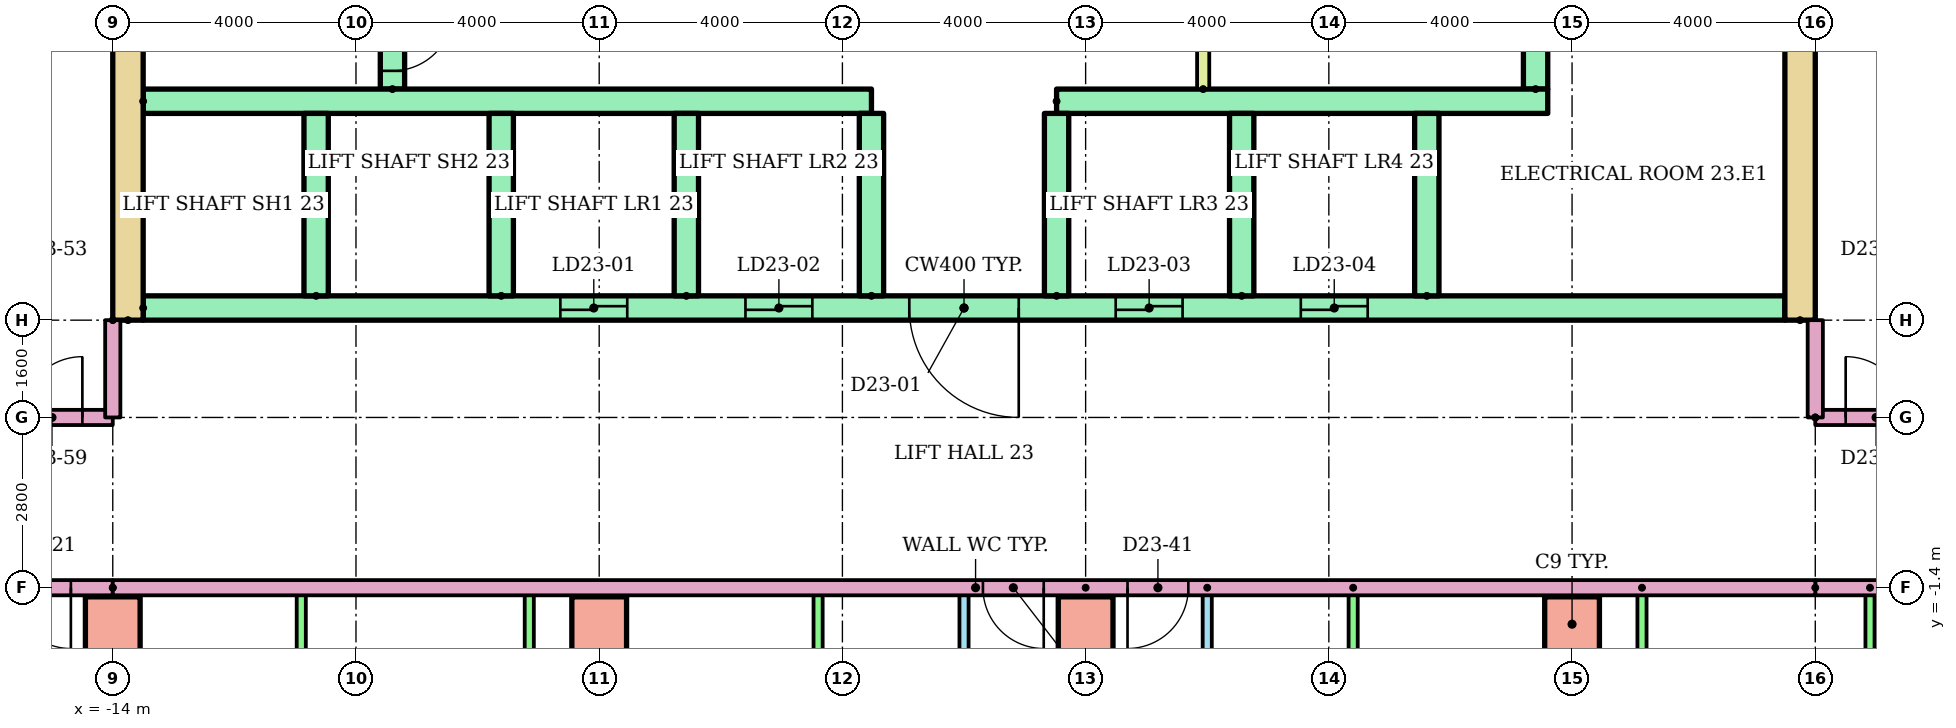
"""IFC4 building model, lengths in metres.
Left out: names, types, materials, properties, quantities, classifications, styles, units other than length and angle.
Written with IfcOpenShell. Run it as: python <this file> out.ifc"""

import sys

from ifc_helpers import new_model, si_unit, direction, frame, frame_2d, origin, origin_2d, place, context, subcontext, project, spatial, rectangle, extrude, element, fill, save


model = new_model("IFC4")
c1 = context("Model", 3, precision=1e-05, world=origin(), true_north=direction((0.0, 1.0)))
c2 = subcontext(c1, "Body", "Model", "MODEL_VIEW")
j1 = project(units=[si_unit("LENGTHUNIT", "METRE"), si_unit("PLANEANGLEUNIT", "RADIAN")], contexts=[c1])
p1 = place(None, origin())
s1 = spatial("IfcSite", under=j1, at=p1, CompositionType="ELEMENT")
p2 = place(p1, origin())
s2 = spatial("IfcBuilding", under=s1, at=p2, CompositionType="ELEMENT")
p3 = place(p2, frame((0.0, 0.0, 90.3)))
s3 = spatial("IfcBuildingStorey", under=s2, at=p3, CompositionType="ELEMENT", Elevation=90.3)
for number, where in (
    (1, (-14.0, -2.0, 0.0)),
    (2, (-6.0, -2.0, 0.0)),
    (3, (2.0, -2.0, 0.0)),
    (4, (10.0, -2.0, 0.0)),
):
    element("IfcColumn", number, at=place(p3, frame(where)), inside=s3, PredefinedType="COLUMN", context=c2, shape_type="SweptSolid", body=[
        extrude(rectangle(XDim=0.9, YDim=0.9, at=origin_2d()), origin(), (0.0, 0.0, 1.0), 3.2),
    ])
for number, where, z_axis, x_axis in (
    (5, (-13.75, 3.0, 0.0), (0.0, 0.0, 1.0), (0.0, 1.0, 0.0)),
    (6, (13.75, 3.0, 0.0), (0.0, 0.0, 1.0), (0.0, 1.0, 0.0)),
):
    element("IfcWall", number, at=place(p3, frame(where, z_axis=z_axis, x_axis=x_axis)), inside=s3, PredefinedType="SHEAR", context=c2, shape_type="SweptSolid", body=[
        extrude(rectangle(XDim=17.0, YDim=0.5, at=frame_2d((8.5, 0.0))), origin(), (0.0, 0.0, 1.0), 2.92),
    ])
p4 = place(p3, frame((-9.4, 6.8, 0.0), z_axis=(0.0, 0.0, 1.0), x_axis=(0.0, 1.0, 0.0)))
e7 = element("IfcWall", 7, at=p4, inside=s3, PredefinedType="SHEAR", context=c2, shape_type="SweptSolid", body=[
    extrude(rectangle(XDim=12.7, YDim=0.4, at=frame_2d((6.35, 0.0))), origin(), (0.0, 0.0, 1.0), 2.92),
])
p5 = place(p4, frame((0.3, 0.0, 0.0)))
e8 = element("IfcOpeningElement", 8, at=p5, cuts=e7, PredefinedType="OPENING", context=c2, shape_type="SweptSolid", body=[
    extrude(rectangle(XDim=1.0, YDim=2.1, at=frame_2d((0.5, 1.05))), frame((0.0, 0.21, 0.0), z_axis=(0.0, -1.0, 0.0), x_axis=(1.0, 0.0, 0.0)), (0.0, 0.0, 1.0), 0.42),
])
p6 = place(p4, frame((2.05, 0.0, 0.0)))
e9 = element("IfcOpeningElement", 9, at=p6, cuts=e7, PredefinedType="OPENING", context=c2, shape_type="SweptSolid", body=[
    extrude(rectangle(XDim=1.0, YDim=2.1, at=frame_2d((0.5, 1.05))), frame((0.0, 0.21, 0.0), z_axis=(0.0, -1.0, 0.0), x_axis=(1.0, 0.0, 0.0)), (0.0, 0.0, 1.0), 0.42),
])
p7 = place(p4, frame((7.925, 0.0, 0.0)))
e10 = element("IfcOpeningElement", 10, at=p7, cuts=e7, PredefinedType="OPENING", context=c2, shape_type="SweptSolid", body=[
    extrude(rectangle(XDim=1.0, YDim=2.1, at=frame_2d((0.5, 1.05))), frame((0.0, 0.21, 0.0), z_axis=(0.0, -1.0, 0.0), x_axis=(1.0, 0.0, 0.0)), (0.0, 0.0, 1.0), 0.42),
])
p8 = place(p3, frame((9.4, 6.8, 0.0), z_axis=(0.0, 0.0, 1.0), x_axis=(0.0, 1.0, 0.0)))
e11 = element("IfcWall", 11, at=p8, inside=s3, PredefinedType="SHEAR", context=c2, shape_type="SweptSolid", body=[
    extrude(rectangle(XDim=12.7, YDim=0.4, at=frame_2d((6.35, 0.0))), origin(), (0.0, 0.0, 1.0), 2.92),
])
p9 = place(p8, frame((1.15, 0.0, 0.0)))
e12 = element("IfcOpeningElement", 12, at=p9, cuts=e11, PredefinedType="OPENING", context=c2, shape_type="SweptSolid", body=[
    extrude(rectangle(XDim=1.0, YDim=2.1, at=frame_2d((0.5, 1.05))), frame((0.0, 0.21, 0.0), z_axis=(0.0, -1.0, 0.0), x_axis=(1.0, 0.0, 0.0)), (0.0, 0.0, 1.0), 0.42),
])
p10 = place(p8, frame((7.925, 0.0, 0.0)))
e13 = element("IfcOpeningElement", 13, at=p10, cuts=e11, PredefinedType="OPENING", context=c2, shape_type="SweptSolid", body=[
    extrude(rectangle(XDim=1.0, YDim=2.1, at=frame_2d((0.5, 1.05))), frame((0.0, 0.21, 0.0), z_axis=(0.0, -1.0, 0.0), x_axis=(1.0, 0.0, 0.0)), (0.0, 0.0, 1.0), 0.42),
])
p11 = place(p3, frame((-13.5, 3.2, 0.0)))
e14 = element("IfcWall", 14, at=p11, inside=s3, PredefinedType="SHEAR", context=c2, shape_type="SweptSolid", body=[
    extrude(rectangle(XDim=27.0, YDim=0.4, at=frame_2d((13.5, 0.0))), origin(), (0.0, 0.0, 1.0), 2.92),
])
p12 = place(p11, frame((6.861, 0.0, 0.0)))
e15 = element("IfcOpeningElement", 15, at=p12, cuts=e14, PredefinedType="OPENING", context=c2, shape_type="SweptSolid", body=[
    extrude(rectangle(XDim=1.1, YDim=2.1, at=frame_2d((0.55, 1.05))), frame((0.0, 0.21, 0.0), z_axis=(0.0, -1.0, 0.0), x_axis=(1.0, 0.0, 0.0)), (0.0, 0.0, 1.0), 0.42),
])
p13 = place(p11, frame((9.906, 0.0, 0.0)))
e16 = element("IfcOpeningElement", 16, at=p13, cuts=e14, PredefinedType="OPENING", context=c2, shape_type="SweptSolid", body=[
    extrude(rectangle(XDim=1.1, YDim=2.1, at=frame_2d((0.55, 1.05))), frame((0.0, 0.21, 0.0), z_axis=(0.0, -1.0, 0.0), x_axis=(1.0, 0.0, 0.0)), (0.0, 0.0, 1.0), 0.42),
])
p14 = place(p11, frame((15.994, 0.0, 0.0)))
e17 = element("IfcOpeningElement", 17, at=p14, cuts=e14, PredefinedType="OPENING", context=c2, shape_type="SweptSolid", body=[
    extrude(rectangle(XDim=1.1, YDim=2.1, at=frame_2d((0.55, 1.05))), frame((0.0, 0.21, 0.0), z_axis=(0.0, -1.0, 0.0), x_axis=(1.0, 0.0, 0.0)), (0.0, 0.0, 1.0), 0.42),
])
p15 = place(p11, frame((19.039, 0.0, 0.0)))
e18 = element("IfcOpeningElement", 18, at=p15, cuts=e14, PredefinedType="OPENING", context=c2, shape_type="SweptSolid", body=[
    extrude(rectangle(XDim=1.1, YDim=2.1, at=frame_2d((0.55, 1.05))), frame((0.0, 0.21, 0.0), z_axis=(0.0, -1.0, 0.0), x_axis=(1.0, 0.0, 0.0)), (0.0, 0.0, 1.0), 0.42),
])
p16 = place(p11, frame((12.6, 0.0, 0.0)))
e19 = element("IfcOpeningElement", 19, at=p16, cuts=e14, PredefinedType="OPENING", context=c2, shape_type="SweptSolid", body=[
    extrude(rectangle(XDim=1.8, YDim=2.1, at=frame_2d((0.9, 1.05))), frame((0.0, 0.21, 0.0), z_axis=(0.0, -1.0, 0.0), x_axis=(1.0, 0.0, 0.0)), (0.0, 0.0, 1.0), 0.42),
])
p17 = place(p3, frame((-13.5, 6.6, 0.0)))
e20 = element("IfcWall", 20, at=p17, inside=s3, PredefinedType="SHEAR", context=c2, shape_type="SweptSolid", body=[
    extrude(rectangle(XDim=11.978, YDim=0.4, at=frame_2d((5.989, 0.0))), origin(), (0.0, 0.0, 1.0), 2.92),
])
p18 = place(p3, frame((1.522, 6.6, 0.0)))
e21 = element("IfcWall", 21, at=p18, inside=s3, PredefinedType="SHEAR", context=c2, shape_type="SweptSolid", body=[
    extrude(rectangle(XDim=8.078, YDim=0.4, at=frame_2d((4.039, 0.0))), origin(), (0.0, 0.0, 1.0), 2.92),
])
for number, where, z_axis, x_axis in (
    (22, (-10.656, 3.4, 0.0), (0.0, 0.0, 1.0), (0.0, 1.0, 0.0)),
    (23, (-7.611, 3.4, 0.0), (0.0, 0.0, 1.0), (0.0, 1.0, 0.0)),
    (24, (-4.567, 3.4, 0.0), (0.0, 0.0, 1.0), (0.0, 1.0, 0.0)),
    (25, (-1.522, 3.4, 0.0), (0.0, 0.0, 1.0), (0.0, 1.0, 0.0)),
    (26, (1.522, 3.4, 0.0), (0.0, 0.0, 1.0), (0.0, 1.0, 0.0)),
    (27, (4.567, 3.4, 0.0), (0.0, 0.0, 1.0), (0.0, 1.0, 0.0)),
    (28, (7.611, 3.4, 0.0), (0.0, 0.0, 1.0), (0.0, 1.0, 0.0)),
):
    element("IfcWall", number, at=place(p3, frame(where, z_axis=z_axis, x_axis=x_axis)), inside=s3, PredefinedType="SHEAR", context=c2, shape_type="SweptSolid", body=[
        extrude(rectangle(XDim=3.0, YDim=0.4, at=frame_2d((1.5, 0.0))), origin(), (0.0, 0.0, 1.0), 2.92),
    ])
p19 = place(p3, frame((3.933, 6.8, 0.0), z_axis=(0.0, 0.0, 1.0), x_axis=(0.0, 1.0, 0.0)))
e29 = element("IfcWall", 29, at=p19, inside=s3, PredefinedType="PARTITIONING", context=c2, shape_type="SweptSolid", body=[
    extrude(rectangle(XDim=3.3, YDim=0.2, at=frame_2d((1.65, 0.0))), origin(), (0.0, 0.0, 1.0), 2.92),
])
p20 = place(p19, frame((1.1, 0.0, 0.0)))
e30 = element("IfcOpeningElement", 30, at=p20, cuts=e29, PredefinedType="OPENING", context=c2, shape_type="SweptSolid", body=[
    extrude(rectangle(XDim=1.1, YDim=2.1, at=frame_2d((0.55, 1.05))), frame((0.0, 0.11, 0.0), z_axis=(0.0, -1.0, 0.0), x_axis=(1.0, 0.0, 0.0)), (0.0, 0.0, 1.0), 0.22),
])
p21 = place(p3, frame((0.0, -9.1, 0.0), z_axis=(0.0, 0.0, 1.0), x_axis=(0.0, 1.0, 0.0)))
e31 = element("IfcWall", 31, at=p21, inside=s3, PredefinedType="PARTITIONING", context=c2, shape_type="SweptSolid", body=[
    extrude(rectangle(XDim=7.7, YDim=0.15, at=frame_2d((3.85, 0.0))), origin(), (0.0, 0.0, 1.0), 2.4),
])
p22 = place(p21, frame((5.125, 0.0, 0.0)))
e32 = element("IfcOpeningElement", 32, at=p22, cuts=e31, PredefinedType="OPENING", context=c2, shape_type="SweptSolid", body=[
    extrude(rectangle(XDim=0.9, YDim=2.1, at=frame_2d((0.45, 1.05))), frame((0.0, 0.085, 0.0), z_axis=(0.0, -1.0, 0.0), x_axis=(1.0, 0.0, 0.0)), (0.0, 0.0, 1.0), 0.17),
])
p23 = place(p21, frame((1.325, 0.0, 0.0)))
e33 = element("IfcOpeningElement", 33, at=p23, cuts=e31, PredefinedType="OPENING", context=c2, shape_type="SweptSolid", body=[
    extrude(rectangle(XDim=0.8, YDim=2.1, at=frame_2d((0.4, 1.05))), frame((0.0, 0.085, 0.0), z_axis=(0.0, -1.0, 0.0), x_axis=(1.0, 0.0, 0.0)), (0.0, 0.0, 1.0), 0.17),
])
for number, where, z_axis, x_axis in (
    (34, (-2.4, -9.1, 0.0), (0.0, 0.0, 1.0), (0.0, 1.0, 0.0)),
    (35, (-7.15, -9.1, 0.0), (0.0, 0.0, 1.0), (0.0, 1.0, 0.0)),
    (36, (-10.9, -9.1, 0.0), (0.0, 0.0, 1.0), (0.0, 1.0, 0.0)),
):
    element("IfcWall", number, at=place(p3, frame(where, z_axis=z_axis, x_axis=x_axis)), inside=s3, PredefinedType="PARTITIONING", context=c2, shape_type="SweptSolid", body=[
        extrude(rectangle(XDim=7.7, YDim=0.15, at=frame_2d((3.85, 0.0))), origin(), (0.0, 0.0, 1.0), 2.4),
    ])
p24 = place(p3, frame((-14.0, -1.4, 0.0), z_axis=(0.0, 0.0, 1.0), x_axis=(0.0, -1.0, 0.0)))
e37 = element("IfcWall", 37, at=p24, inside=s3, PredefinedType="PARTITIONING", context=c2, shape_type="SweptSolid", body=[
    extrude(rectangle(XDim=14.81, YDim=0.25, at=frame_2d((7.405, 0.0))), origin(), (0.0, 0.0, 1.0), 2.4),
])
p25 = place(p3, frame((4.0, -1.4, 0.0), z_axis=(0.0, 0.0, 1.0), x_axis=(0.0, -1.0, 0.0)))
e38 = element("IfcWall", 38, at=p25, inside=s3, PredefinedType="PARTITIONING", context=c2, shape_type="SweptSolid", body=[
    extrude(rectangle(XDim=7.7, YDim=0.15, at=frame_2d((3.85, 0.0))), origin(), (0.0, 0.0, 1.0), 2.4),
])
p26 = place(p25, frame((1.675, 0.0, 0.0)))
e39 = element("IfcOpeningElement", 39, at=p26, cuts=e38, PredefinedType="OPENING", context=c2, shape_type="SweptSolid", body=[
    extrude(rectangle(XDim=0.9, YDim=2.1, at=frame_2d((0.45, 1.05))), frame((0.0, 0.085, 0.0), z_axis=(0.0, -1.0, 0.0), x_axis=(1.0, 0.0, 0.0)), (0.0, 0.0, 1.0), 0.17),
])
p27 = place(p25, frame((5.575, 0.0, 0.0)))
e40 = element("IfcOpeningElement", 40, at=p27, cuts=e38, PredefinedType="OPENING", context=c2, shape_type="SweptSolid", body=[
    extrude(rectangle(XDim=0.8, YDim=2.1, at=frame_2d((0.4, 1.05))), frame((0.0, 0.085, 0.0), z_axis=(0.0, -1.0, 0.0), x_axis=(1.0, 0.0, 0.0)), (0.0, 0.0, 1.0), 0.17),
])
for number, where, z_axis, x_axis in (
    (41, (6.4, -1.4, 0.0), (0.0, 0.0, 1.0), (0.0, -1.0, 0.0)),
    (42, (11.15, -1.4, 0.0), (0.0, 0.0, 1.0), (0.0, -1.0, 0.0)),
    (43, (14.9, -1.4, 0.0), (0.0, 0.0, 1.0), (0.0, -1.0, 0.0)),
):
    element("IfcWall", number, at=place(p3, frame(where, z_axis=z_axis, x_axis=x_axis)), inside=s3, PredefinedType="PARTITIONING", context=c2, shape_type="SweptSolid", body=[
        extrude(rectangle(XDim=7.7, YDim=0.15, at=frame_2d((3.85, 0.0))), origin(), (0.0, 0.0, 1.0), 2.4),
    ])
p28 = place(p3, frame((2.0, -1.4, 0.0), z_axis=(0.0, 0.0, 1.0), x_axis=(0.0, -1.0, 0.0)))
e44 = element("IfcWall", 44, at=p28, inside=s3, PredefinedType="PARTITIONING", context=c2, shape_type="SweptSolid", body=[
    extrude(rectangle(XDim=14.81, YDim=0.25, at=frame_2d((7.405, 0.0))), origin(), (0.0, 0.0, 1.0), 2.4),
])
p29 = place(p3, frame((-14.0, -1.4, 0.0), z_axis=(0.0, 0.0, 1.0), x_axis=(-1.0, 0.0, 0.0)))
e45 = element("IfcWall", 45, at=p29, inside=s3, PredefinedType="PARTITIONING", context=c2, shape_type="SweptSolid", body=[
    extrude(rectangle(XDim=14.62, YDim=0.25, at=frame_2d((7.31, 0.0))), origin(), (0.0, 0.0, 1.0), 2.4),
])
p30 = place(p29, frame((0.689, 0.0, 0.0)))
e46 = element("IfcOpeningElement", 46, at=p30, cuts=e45, PredefinedType="OPENING", context=c2, shape_type="SweptSolid", body=[
    extrude(rectangle(XDim=1.0, YDim=2.1, at=frame_2d((0.5, 1.05))), frame((0.0, 0.135, 0.0), z_axis=(0.0, -1.0, 0.0), x_axis=(1.0, 0.0, 0.0)), (0.0, 0.0, 1.0), 0.27),
])
p31 = place(p3, frame((29.0, -1.4, 0.0), z_axis=(0.0, 0.0, 1.0), x_axis=(-1.0, 0.0, 0.0)))
e47 = element("IfcWall", 47, at=p31, inside=s3, PredefinedType="PARTITIONING", context=c2, shape_type="SweptSolid", body=[
    extrude(rectangle(XDim=15.0, YDim=0.25, at=frame_2d((7.5, 0.0))), origin(), (0.0, 0.0, 1.0), 2.4),
])
p32 = place(p31, frame((9.311, 0.0, 0.0)))
e48 = element("IfcOpeningElement", 48, at=p32, cuts=e47, PredefinedType="OPENING", context=c2, shape_type="SweptSolid", body=[
    extrude(rectangle(XDim=1.0, YDim=2.1, at=frame_2d((0.5, 1.05))), frame((0.0, 0.135, 0.0), z_axis=(0.0, -1.0, 0.0), x_axis=(1.0, 0.0, 0.0)), (0.0, 0.0, 1.0), 0.27),
])
p33 = place(p3, frame((-28.62, 1.4, 0.0)))
e49 = element("IfcWall", 49, at=p33, inside=s3, PredefinedType="PARTITIONING", context=c2, shape_type="SweptSolid", body=[
    extrude(rectangle(XDim=14.62, YDim=0.25, at=frame_2d((7.31, 0.0))), origin(), (0.0, 0.0, 1.0), 2.4),
])
p34 = place(p33, frame((13.12, 0.0, 0.0)))
e50 = element("IfcOpeningElement", 50, at=p34, cuts=e49, PredefinedType="OPENING", context=c2, shape_type="SweptSolid", body=[
    extrude(rectangle(XDim=1.0, YDim=2.1, at=frame_2d((0.5, 1.05))), frame((0.0, 0.135, 0.0), z_axis=(0.0, -1.0, 0.0), x_axis=(1.0, 0.0, 0.0)), (0.0, 0.0, 1.0), 0.27),
])
p35 = place(p3, frame((14.0, 1.4, 0.0)))
e51 = element("IfcWall", 51, at=p35, inside=s3, PredefinedType="PARTITIONING", context=c2, shape_type="SweptSolid", body=[
    extrude(rectangle(XDim=15.0, YDim=0.25, at=frame_2d((7.5, 0.0))), origin(), (0.0, 0.0, 1.0), 2.4),
])
p36 = place(p35, frame((0.5, 0.0, 0.0)))
e52 = element("IfcOpeningElement", 52, at=p36, cuts=e51, PredefinedType="OPENING", context=c2, shape_type="SweptSolid", body=[
    extrude(rectangle(XDim=1.0, YDim=2.1, at=frame_2d((0.5, 1.05))), frame((0.0, 0.135, 0.0), z_axis=(0.0, -1.0, 0.0), x_axis=(1.0, 0.0, 0.0)), (0.0, 0.0, 1.0), 0.27),
])
p37 = place(p35, frame((12.689, 0.0, 0.0)))
e53 = element("IfcOpeningElement", 53, at=p37, cuts=e51, PredefinedType="OPENING", context=c2, shape_type="SweptSolid", body=[
    extrude(rectangle(XDim=1.0, YDim=2.1, at=frame_2d((0.5, 1.05))), frame((0.0, 0.135, 0.0), z_axis=(0.0, -1.0, 0.0), x_axis=(1.0, 0.0, 0.0)), (0.0, 0.0, 1.0), 0.27),
])
p38 = place(p3, frame((14.0, -1.4, 0.0), z_axis=(0.0, 0.0, 1.0), x_axis=(-1.0, 0.0, 0.0)))
e54 = element("IfcWall", 54, at=p38, inside=s3, PredefinedType="PARTITIONING", context=c2, shape_type="SweptSolid", body=[
    extrude(rectangle(XDim=28.0, YDim=0.25, at=frame_2d((14.0, 0.0))), origin(), (0.0, 0.0, 1.0), 2.4),
])
p39 = place(p38, frame((12.689, 0.0, 0.0)))
e55 = element("IfcOpeningElement", 55, at=p39, cuts=e54, PredefinedType="OPENING", context=c2, shape_type="SweptSolid", body=[
    extrude(rectangle(XDim=1.0, YDim=2.1, at=frame_2d((0.5, 1.05))), frame((0.0, 0.135, 0.0), z_axis=(0.0, -1.0, 0.0), x_axis=(1.0, 0.0, 0.0)), (0.0, 0.0, 1.0), 0.27),
])
p40 = place(p38, frame((10.311, 0.0, 0.0)))
e56 = element("IfcOpeningElement", 56, at=p40, cuts=e54, PredefinedType="OPENING", context=c2, shape_type="SweptSolid", body=[
    extrude(rectangle(XDim=1.0, YDim=2.1, at=frame_2d((0.5, 1.05))), frame((0.0, 0.135, 0.0), z_axis=(0.0, -1.0, 0.0), x_axis=(1.0, 0.0, 0.0)), (0.0, 0.0, 1.0), 0.27),
])
for number, where, z_axis, x_axis in (
    (57, (-14.0, 3.0, 0.0), (0.0, 0.0, 1.0), (0.0, -1.0, 0.0)),
    (58, (14.0, 1.4, 0.0), (0.0, 0.0, 1.0), (0.0, 1.0, 0.0)),
):
    element("IfcWall", number, at=place(p3, frame(where, z_axis=z_axis, x_axis=x_axis)), inside=s3, PredefinedType="PARTITIONING", context=c2, shape_type="SweptSolid", body=[
        extrude(rectangle(XDim=1.6, YDim=0.25, at=frame_2d((0.8, 0.0))), origin(), (0.0, 0.0, 1.0), 2.4),
    ])
p41 = place(p12, origin())
e59 = element("IfcDoor", 59, at=p41, inside=s3, OperationType="SLIDING_TO_LEFT", PredefinedType="DOOR", context=c2, shape_type="SweptSolid", body=[
    extrude(rectangle(XDim=1.1, YDim=2.1, at=frame_2d((0.55, 1.05))), frame((0.0, 0.025, 0.0), z_axis=(0.0, -1.0, 0.0), x_axis=(1.0, 0.0, 0.0)), (0.0, 0.0, 1.0), 0.05),
])
fill(e15, e59)
p42 = place(p13, origin())
e60 = element("IfcDoor", 60, at=p42, inside=s3, OperationType="SLIDING_TO_LEFT", PredefinedType="DOOR", context=c2, shape_type="SweptSolid", body=[
    extrude(rectangle(XDim=1.1, YDim=2.1, at=frame_2d((0.55, 1.05))), frame((0.0, 0.025, 0.0), z_axis=(0.0, -1.0, 0.0), x_axis=(1.0, 0.0, 0.0)), (0.0, 0.0, 1.0), 0.05),
])
fill(e16, e60)
p43 = place(p14, origin())
e61 = element("IfcDoor", 61, at=p43, inside=s3, OperationType="SLIDING_TO_LEFT", PredefinedType="DOOR", context=c2, shape_type="SweptSolid", body=[
    extrude(rectangle(XDim=1.1, YDim=2.1, at=frame_2d((0.55, 1.05))), frame((0.0, 0.025, 0.0), z_axis=(0.0, -1.0, 0.0), x_axis=(1.0, 0.0, 0.0)), (0.0, 0.0, 1.0), 0.05),
])
fill(e17, e61)
p44 = place(p15, origin())
e62 = element("IfcDoor", 62, at=p44, inside=s3, OperationType="SLIDING_TO_LEFT", PredefinedType="DOOR", context=c2, shape_type="SweptSolid", body=[
    extrude(rectangle(XDim=1.1, YDim=2.1, at=frame_2d((0.55, 1.05))), frame((0.0, 0.025, 0.0), z_axis=(0.0, -1.0, 0.0), x_axis=(1.0, 0.0, 0.0)), (0.0, 0.0, 1.0), 0.05),
])
fill(e18, e62)
p45 = place(p16, frame((1.8, 0.0, 0.0), z_axis=(0.0, 0.0, 1.0), x_axis=(-1.0, 0.0, 0.0)))
e63 = element("IfcDoor", 63, at=p45, inside=s3, OperationType="DOUBLE_DOOR_SINGLE_SWING", PredefinedType="DOOR", context=c2, shape_type="SweptSolid", body=[
    extrude(rectangle(XDim=1.8, YDim=2.1, at=frame_2d((0.9, 1.05))), frame((0.0, 0.025, 0.0), z_axis=(0.0, -1.0, 0.0), x_axis=(1.0, 0.0, 0.0)), (0.0, 0.0, 1.0), 0.05),
])
fill(e19, e63)
p46 = place(p5, frame((1.0, 0.0, 0.0), z_axis=(0.0, 0.0, 1.0), x_axis=(-1.0, 0.0, 0.0)))
e64 = element("IfcDoor", 64, at=p46, inside=s3, OperationType="SINGLE_SWING_RIGHT", PredefinedType="DOOR", context=c2, shape_type="SweptSolid", body=[
    extrude(rectangle(XDim=1.0, YDim=2.1, at=frame_2d((0.5, 1.05))), frame((0.0, 0.025, 0.0), z_axis=(0.0, -1.0, 0.0), x_axis=(1.0, 0.0, 0.0)), (0.0, 0.0, 1.0), 0.05),
])
fill(e8, e64)
p47 = place(p30, origin())
e65 = element("IfcDoor", 65, at=p47, inside=s3, OperationType="SINGLE_SWING_LEFT", PredefinedType="DOOR", context=c2, shape_type="SweptSolid", body=[
    extrude(rectangle(XDim=1.0, YDim=2.1, at=frame_2d((0.5, 1.05))), frame((0.0, 0.025, 0.0), z_axis=(0.0, -1.0, 0.0), x_axis=(1.0, 0.0, 0.0)), (0.0, 0.0, 1.0), 0.05),
])
fill(e46, e65)
p48 = place(p39, origin())
e66 = element("IfcDoor", 66, at=p48, inside=s3, OperationType="SINGLE_SWING_LEFT", PredefinedType="DOOR", context=c2, shape_type="SweptSolid", body=[
    extrude(rectangle(XDim=1.0, YDim=2.1, at=frame_2d((0.5, 1.05))), frame((0.0, 0.025, 0.0), z_axis=(0.0, -1.0, 0.0), x_axis=(1.0, 0.0, 0.0)), (0.0, 0.0, 1.0), 0.05),
])
fill(e55, e66)
p49 = place(p40, origin())
e67 = element("IfcDoor", 67, at=p49, inside=s3, OperationType="SINGLE_SWING_RIGHT", PredefinedType="DOOR", context=c2, shape_type="SweptSolid", body=[
    extrude(rectangle(XDim=1.0, YDim=2.1, at=frame_2d((0.5, 1.05))), frame((0.0, 0.025, 0.0), z_axis=(0.0, -1.0, 0.0), x_axis=(1.0, 0.0, 0.0)), (0.0, 0.0, 1.0), 0.05),
])
fill(e56, e67)
p50 = place(p34, origin())
e68 = element("IfcDoor", 68, at=p50, inside=s3, OperationType="SINGLE_SWING_RIGHT", PredefinedType="DOOR", context=c2, shape_type="SweptSolid", body=[
    extrude(rectangle(XDim=1.0, YDim=2.1, at=frame_2d((0.5, 1.05))), frame((0.0, 0.025, 0.0), z_axis=(0.0, -1.0, 0.0), x_axis=(1.0, 0.0, 0.0)), (0.0, 0.0, 1.0), 0.05),
])
fill(e50, e68)
p51 = place(p36, origin())
e69 = element("IfcDoor", 69, at=p51, inside=s3, OperationType="SINGLE_SWING_LEFT", PredefinedType="DOOR", context=c2, shape_type="SweptSolid", body=[
    extrude(rectangle(XDim=1.0, YDim=2.1, at=frame_2d((0.5, 1.05))), frame((0.0, 0.025, 0.0), z_axis=(0.0, -1.0, 0.0), x_axis=(1.0, 0.0, 0.0)), (0.0, 0.0, 1.0), 0.05),
])
fill(e52, e69)
save(model, sys.argv[1])
